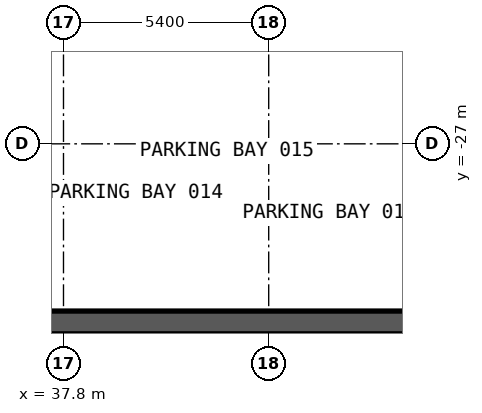
"""IFC4 building model, lengths in metres.
Left out: names, types, materials, properties, quantities, classifications, styles, units other than length and angle.
Written with IfcOpenShell. Run it as: python <this file> out.ifc"""

import sys

from ifc_helpers import new_model, si_unit, direction, frame, frame_2d, origin, place, context, subcontext, project, spatial, rectangle, extrude, element, save


model = new_model("IFC4")
c1 = context("Model", 3, precision=1e-05, world=origin(), true_north=direction((0.0, 1.0)))
c2 = subcontext(c1, "Body", "Model", "MODEL_VIEW")
j1 = project(units=[si_unit("LENGTHUNIT", "METRE"), si_unit("PLANEANGLEUNIT", "RADIAN")], contexts=[c1])
p1 = place(None, origin())
s1 = spatial("IfcSite", under=j1, at=p1, CompositionType="ELEMENT")
p2 = place(p1, origin())
s2 = spatial("IfcBuilding", under=s1, at=p2, CompositionType="ELEMENT")
p3 = place(p2, frame((0.0, 0.0, -8.4)))
s3 = spatial("IfcBuildingStorey", under=s2, at=p3, CompositionType="ELEMENT", Elevation=-8.4)
p4 = place(p3, frame((-48.0, -31.7, -0.35), z_axis=(0.0, 0.0, 1.0), x_axis=(1.0, 0.0, 0.0)))
e1 = element("IfcWall", 1, at=p4, inside=s3, PredefinedType="SOLIDWALL", context=c2, shape_type="SweptSolid", body=[
    extrude(rectangle(XDim=96.0, YDim=0.6, at=frame_2d((48.0, 0.0))), origin(), (0.0, 0.0, 1.0), 4.55),
])
save(model, sys.argv[1])
